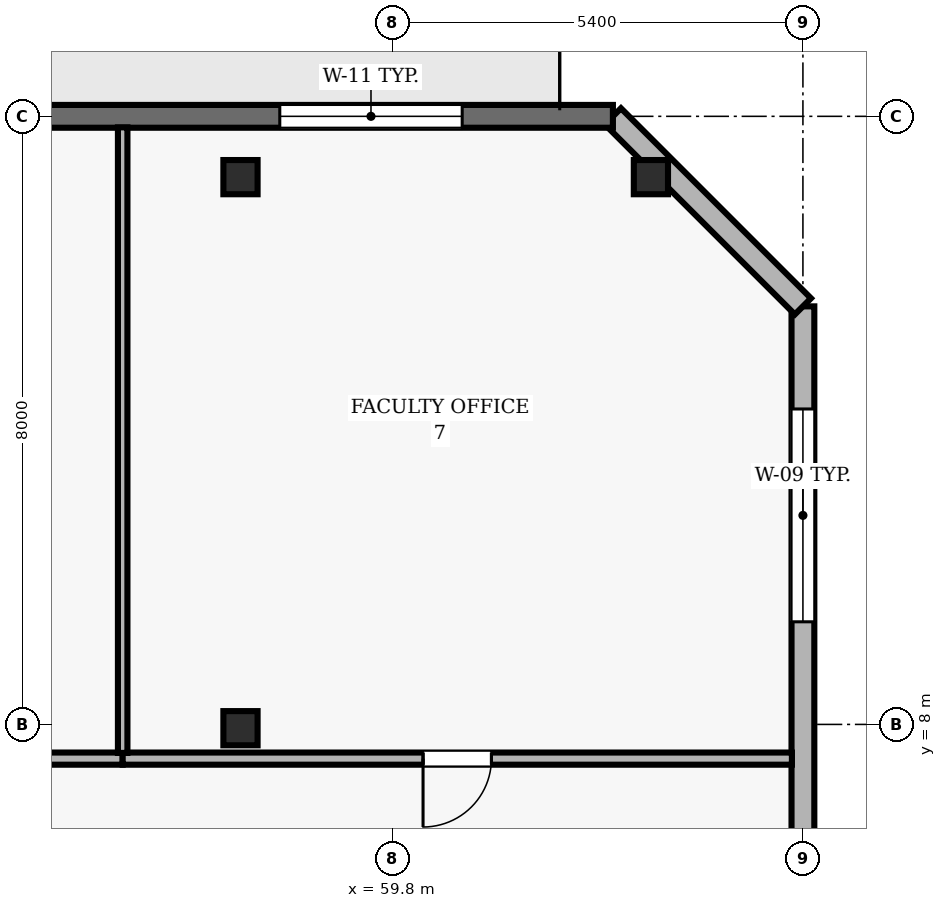
"""IFC4 building model, lengths in metres.
Left out: names, types, materials, properties, quantities, classifications, styles, units other than length and angle.
Written with IfcOpenShell. Run it as: python <this file> out.ifc"""

import sys

from ifc_helpers import new_model, si_unit, direction, frame, frame_2d, origin, origin_2d, place, context, subcontext, project, spatial, rectangle, hollow_rectangle, extrude, element, fill, save


model = new_model("IFC4")
c1 = context("Model", 3, precision=1e-05, world=origin(), true_north=direction((0.0, 1.0)))
c2 = subcontext(c1, "Body", "Model", "MODEL_VIEW")
j1 = project(units=[si_unit("LENGTHUNIT", "METRE"), si_unit("PLANEANGLEUNIT", "RADIAN")], contexts=[c1])
p1 = place(None, origin())
s1 = spatial("IfcSite", under=j1, at=p1, CompositionType="ELEMENT")
p2 = place(p1, origin())
s2 = spatial("IfcBuilding", under=s1, at=p2, CompositionType="ELEMENT")
p3 = place(p2, frame((0.0, 0.0, 222.6)))
s3 = spatial("IfcBuildingStorey", under=s2, at=p3, CompositionType="ELEMENT", Elevation=222.6)
for number, where, z_axis, x_axis in (
    (1, (57.8, 7.95, 0.0), (0.0, 0.0, 1.0), (1.0, 0.0, 0.0)),
    (2, (57.8, 15.2, 0.0), (0.0, 0.0, 1.0), (1.0, 0.0, 0.0)),
    (3, (63.2, 15.2, 0.0), (0.0, 0.0, 1.0), (1.0, 0.0, 0.0)),
):
    element("IfcColumn", number, at=place(p3, frame(where, z_axis=z_axis, x_axis=x_axis)), inside=s3, PredefinedType="COLUMN", context=c2, shape_type="SweptSolid", body=[
        extrude(hollow_rectangle(XDim=0.45, YDim=0.45, WallThickness=0.02, at=origin_2d()), origin(), (0.0, 0.0, 1.0), 3.9),
    ])
p4 = place(p3, frame((65.2, 2.5, 0.0), z_axis=(0.0, 0.0, 1.0), x_axis=(0.0, 1.0, 0.0)))
e4 = element("IfcWall", 4, at=p4, inside=s3, PredefinedType="SOLIDWALL", context=c2, shape_type="SweptSolid", body=[
    extrude(rectangle(XDim=11.0, YDim=0.3, at=frame_2d((5.5, 0.0))), origin(), (0.0, 0.0, 1.0), 3.69),
])
p5 = place(p4, frame((6.85, 0.0, 0.9)))
e5 = element("IfcOpeningElement", 5, at=p5, cuts=e4, PredefinedType="OPENING", context=c2, shape_type="SweptSolid", body=[
    extrude(rectangle(XDim=2.8, YDim=1.8, at=frame_2d((1.4, 0.9))), frame((0.0, 0.16, 0.0), z_axis=(0.0, -1.0, 0.0), x_axis=(1.0, 0.0, 0.0)), (0.0, 0.0, 1.0), 0.32),
])
p6 = place(p3, frame((65.2, 13.5, 0.0), z_axis=(0.0, 0.0, 1.0), x_axis=(-0.707106781187, 0.707106781187, 0.0)))
e6 = element("IfcWall", 6, at=p6, inside=s3, PredefinedType="SOLIDWALL", context=c2, shape_type="SweptSolid", body=[
    extrude(rectangle(XDim=3.536, YDim=0.3, at=frame_2d((1.768, 0.0))), origin(), (0.0, 0.0, 1.0), 3.69),
])
p7 = place(p3, frame((62.7, 16.0, 0.0), z_axis=(0.0, 0.0, 1.0), x_axis=(-1.0, 0.0, 0.0)))
e7 = element("IfcWall", 7, at=p7, inside=s3, PredefinedType="SOLIDWALL", context=c2, shape_type="SweptSolid", body=[
    extrude(rectangle(XDim=19.1, YDim=0.3, at=frame_2d((9.55, 0.0))), origin(), (0.0, 0.0, 1.0), 3.69),
])
p8 = place(p7, frame((7.55, 0.0, 0.0)))
e8 = element("IfcOpeningElement", 8, at=p8, cuts=e7, PredefinedType="OPENING", context=c2, shape_type="SweptSolid", body=[
    extrude(rectangle(XDim=1.0, YDim=2.2, at=frame_2d((0.5, 1.1))), frame((0.0, 0.16, 0.0), z_axis=(0.0, -1.0, 0.0), x_axis=(1.0, 0.0, 0.0)), (0.0, 0.0, 1.0), 0.32),
])
p9 = place(p7, frame((1.983, 0.0, 0.9)))
e9 = element("IfcOpeningElement", 9, at=p9, cuts=e7, PredefinedType="OPENING", context=c2, shape_type="SweptSolid", body=[
    extrude(rectangle(XDim=2.4, YDim=2.2, at=frame_2d((1.2, 1.1))), frame((0.0, 0.16, 0.0), z_axis=(0.0, -1.0, 0.0), x_axis=(1.0, 0.0, 0.0)), (0.0, 0.0, 1.0), 0.32),
])
p10 = place(p7, frame((9.25, 0.0, 0.9)))
e10 = element("IfcOpeningElement", 10, at=p10, cuts=e7, PredefinedType="OPENING", context=c2, shape_type="SweptSolid", body=[
    extrude(rectangle(XDim=2.4, YDim=2.2, at=frame_2d((1.2, 1.1))), frame((0.0, 0.16, 0.0), z_axis=(0.0, -1.0, 0.0), x_axis=(1.0, 0.0, 0.0)), (0.0, 0.0, 1.0), 0.32),
])
p11 = place(p7, frame((15.617, 0.0, 0.9)))
e11 = element("IfcOpeningElement", 11, at=p11, cuts=e7, PredefinedType="OPENING", context=c2, shape_type="SweptSolid", body=[
    extrude(rectangle(XDim=2.4, YDim=2.2, at=frame_2d((1.2, 1.1))), frame((0.0, 0.16, 0.0), z_axis=(0.0, -1.0, 0.0), x_axis=(1.0, 0.0, 0.0)), (0.0, 0.0, 1.0), 0.32),
])
p12 = place(p3, frame((56.25, 7.55, 0.0), z_axis=(0.0, 0.0, 1.0), x_axis=(-1.0, 0.0, 0.0)))
e12 = element("IfcWall", 12, at=p12, inside=s3, PredefinedType="PARTITIONING", context=c2, shape_type="SweptSolid", body=[
    extrude(rectangle(XDim=8.45, YDim=0.16, at=frame_2d((4.225, 0.0))), origin(), (0.0, 0.0, 1.0), 3.139),
])
p13 = place(p12, frame((5.875, 0.0, 0.0)))
e13 = element("IfcOpeningElement", 13, at=p13, cuts=e12, PredefinedType="OPENING", context=c2, shape_type="SweptSolid", body=[
    extrude(rectangle(XDim=0.9, YDim=2.1, at=frame_2d((0.45, 1.05))), frame((0.0, 0.09, 0.0), z_axis=(0.0, -1.0, 0.0), x_axis=(1.0, 0.0, 0.0)), (0.0, 0.0, 1.0), 0.18),
])
p14 = place(p3, frame((65.055, 7.55, 0.0), z_axis=(0.0, 0.0, 1.0), x_axis=(-1.0, 0.0, 0.0)))
e14 = element("IfcWall", 14, at=p14, inside=s3, PredefinedType="PARTITIONING", context=c2, shape_type="SweptSolid", body=[
    extrude(rectangle(XDim=8.805, YDim=0.16, at=frame_2d((4.402, 0.0))), origin(), (0.0, 0.0, 1.0), 3.139),
])
p15 = place(p14, frame((3.953, 0.0, 0.0)))
e15 = element("IfcOpeningElement", 15, at=p15, cuts=e14, PredefinedType="OPENING", context=c2, shape_type="SweptSolid", body=[
    extrude(rectangle(XDim=0.9, YDim=2.1, at=frame_2d((0.45, 1.05))), frame((0.0, 0.09, 0.0), z_axis=(0.0, -1.0, 0.0), x_axis=(1.0, 0.0, 0.0)), (0.0, 0.0, 1.0), 0.18),
])
p16 = place(p3, frame((56.25, 7.625, 0.0), z_axis=(0.0, 0.0, 1.0), x_axis=(0.0, 1.0, 0.0)))
e16 = element("IfcWall", 16, at=p16, inside=s3, PredefinedType="PARTITIONING", context=c2, shape_type="SweptSolid", body=[
    extrude(rectangle(XDim=8.23, YDim=0.125, at=frame_2d((4.115, 0.0))), origin(), (0.0, 0.0, 1.0), 3.69),
])
p17 = place(p5, origin())
e17 = element("IfcWindow", 17, at=p17, inside=s3, PartitioningType="SINGLE_PANEL", PredefinedType="WINDOW", context=c2, shape_type="SweptSolid", body=[
    extrude(rectangle(XDim=2.8, YDim=1.8, at=frame_2d((1.4, 0.9))), frame((0.0, 0.03, 0.0), z_axis=(0.0, -1.0, 0.0), x_axis=(1.0, 0.0, 0.0)), (0.0, 0.0, 1.0), 0.06),
])
fill(e5, e17)
p18 = place(p9, origin())
e18 = element("IfcWindow", 18, at=p18, inside=s3, PartitioningType="SINGLE_PANEL", PredefinedType="WINDOW", context=c2, shape_type="SweptSolid", body=[
    extrude(rectangle(XDim=2.4, YDim=2.2, at=frame_2d((1.2, 1.1))), frame((0.0, 0.03, 0.0), z_axis=(0.0, -1.0, 0.0), x_axis=(1.0, 0.0, 0.0)), (0.0, 0.0, 1.0), 0.06),
])
fill(e9, e18)
p19 = place(p15, origin())
e19 = element("IfcDoor", 19, at=p19, inside=s3, OperationType="SINGLE_SWING_RIGHT", PredefinedType="DOOR", context=c2, shape_type="SweptSolid", body=[
    extrude(rectangle(XDim=0.9, YDim=2.1, at=frame_2d((0.45, 1.05))), frame((0.0, 0.025, 0.0), z_axis=(0.0, -1.0, 0.0), x_axis=(1.0, 0.0, 0.0)), (0.0, 0.0, 1.0), 0.05),
])
fill(e15, e19)
save(model, sys.argv[1])
